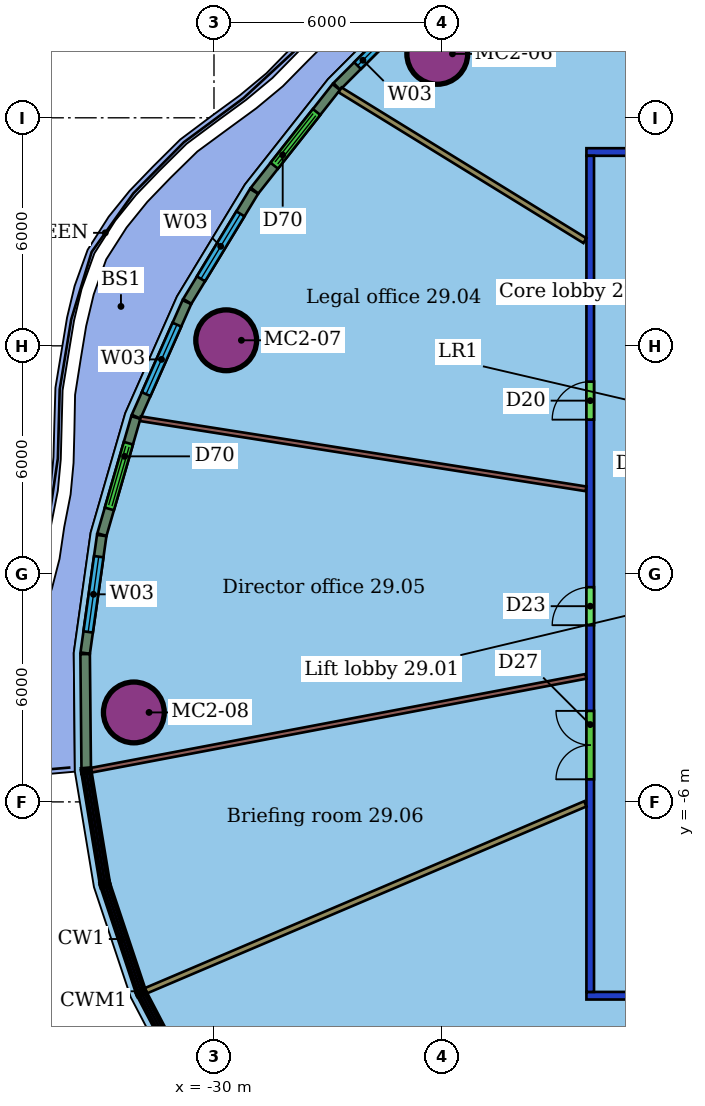
"""IFC4 building model, lengths in metres.
Left out: names, types, materials, properties, quantities, classifications, styles, units other than length and angle.
Written with IfcOpenShell. Run it as: python <this file> out.ifc"""

import sys

from ifc_helpers import new_model, si_unit, direction, frame, frame_2d, origin, origin_2d, place, context, subcontext, project, spatial, rectangle, hollow_circle, extrude, element, fill, save


model = new_model("IFC4")
c1 = context("Model", 3, precision=1e-05, world=origin(), true_north=direction((0.0, 1.0)))
c2 = subcontext(c1, "Body", "Model", "MODEL_VIEW")
j1 = project(units=[si_unit("LENGTHUNIT", "METRE"), si_unit("PLANEANGLEUNIT", "RADIAN")], contexts=[c1])
p1 = place(None, origin())
s1 = spatial("IfcSite", under=j1, at=p1, CompositionType="ELEMENT")
p2 = place(p1, origin())
s2 = spatial("IfcBuilding", under=s1, at=p2, CompositionType="ELEMENT")
p3 = place(p2, frame((0.0, 0.0, 124.6)))
s3 = spatial("IfcBuildingStorey", under=s2, at=p3, CompositionType="ELEMENT", Elevation=124.6)
for number, where, z_axis, x_axis in (
    (1, (-24.125, 13.683, 0.0), (0.0, 0.0, 1.0), (1.0, 0.0, 0.0)),
    (2, (-29.679, 6.146, 0.0), (0.0, 0.0, 1.0), (1.0, 0.0, 0.0)),
    (3, (-32.109, -3.646, 0.0), (0.0, 0.0, 1.0), (1.0, 0.0, 0.0)),
):
    element("IfcColumn", number, at=place(p3, frame(where, z_axis=z_axis, x_axis=x_axis)), inside=s3, PredefinedType="COLUMN", context=c2, shape_type="SweptSolid", body=[
        extrude(hollow_circle(Radius=0.8, WallThickness=0.055, at=origin_2d()), origin(), (0.0, 0.0, 1.0), 3.45),
    ])
p4 = place(p3, frame((8.2, -11.1, 0.0), z_axis=(0.0, 0.0, 1.0), x_axis=(-1.0, 0.0, 0.0)))
e4 = element("IfcWall", 4, at=p4, inside=s3, PredefinedType="PARTITIONING", context=c2, shape_type="SweptSolid", body=[
    extrude(rectangle(XDim=28.4, YDim=0.2, at=frame_2d((14.2, 0.0))), origin(), (0.0, 0.0, 1.0), 3.0),
])
p5 = place(p4, frame((22.496, 0.0, 0.0)))
e5 = element("IfcOpeningElement", 5, at=p5, cuts=e4, PredefinedType="OPENING", context=c2, shape_type="SweptSolid", body=[
    extrude(rectangle(XDim=0.9, YDim=2.1, at=frame_2d((0.45, 1.05))), frame((0.0, 0.11, 0.0), z_axis=(0.0, -1.0, 0.0), x_axis=(1.0, 0.0, 0.0)), (0.0, 0.0, 1.0), 0.22),
])
p6 = place(p4, frame((17.136, 0.0, 0.0)))
e6 = element("IfcOpeningElement", 6, at=p6, cuts=e4, PredefinedType="OPENING", context=c2, shape_type="SweptSolid", body=[
    extrude(rectangle(XDim=1.8, YDim=2.4, at=frame_2d((0.9, 1.2))), frame((0.0, 0.11, 0.0), z_axis=(0.0, -1.0, 0.0), x_axis=(1.0, 0.0, 0.0)), (0.0, 0.0, 1.0), 0.22),
])
p7 = place(p4, frame((12.396, 0.0, 0.0)))
e7 = element("IfcOpeningElement", 7, at=p7, cuts=e4, PredefinedType="OPENING", context=c2, shape_type="SweptSolid", body=[
    extrude(rectangle(XDim=0.9, YDim=2.1, at=frame_2d((0.45, 1.05))), frame((0.0, 0.11, 0.0), z_axis=(0.0, -1.0, 0.0), x_axis=(1.0, 0.0, 0.0)), (0.0, 0.0, 1.0), 0.22),
])
p8 = place(p4, frame((8.099, 0.0, 0.0)))
e8 = element("IfcOpeningElement", 8, at=p8, cuts=e4, PredefinedType="OPENING", context=c2, shape_type="SweptSolid", body=[
    extrude(rectangle(XDim=1.5, YDim=2.1, at=frame_2d((0.75, 1.05))), frame((0.0, 0.11, 0.0), z_axis=(0.0, -1.0, 0.0), x_axis=(1.0, 0.0, 0.0)), (0.0, 0.0, 1.0), 0.22),
])
p9 = place(p3, frame((-20.1, -11.0, 0.0), z_axis=(0.0, 0.0, 1.0), x_axis=(0.0, 1.0, 0.0)))
e9 = element("IfcWall", 9, at=p9, inside=s3, PredefinedType="PARTITIONING", context=c2, shape_type="SweptSolid", body=[
    extrude(rectangle(XDim=22.0, YDim=0.2, at=frame_2d((11.0, 0.0))), origin(), (0.0, 0.0, 1.0), 3.0),
])
p10 = place(p9, frame((15.057, 0.0, 0.0)))
e10 = element("IfcOpeningElement", 10, at=p10, cuts=e9, PredefinedType="OPENING", context=c2, shape_type="SweptSolid", body=[
    extrude(rectangle(XDim=1.0, YDim=2.1, at=frame_2d((0.5, 1.05))), frame((0.0, 0.11, 0.0), z_axis=(0.0, -1.0, 0.0), x_axis=(1.0, 0.0, 0.0)), (0.0, 0.0, 1.0), 0.22),
])
p11 = place(p9, frame((9.649, 0.0, 0.0)))
e11 = element("IfcOpeningElement", 11, at=p11, cuts=e9, PredefinedType="OPENING", context=c2, shape_type="SweptSolid", body=[
    extrude(rectangle(XDim=1.0, YDim=2.4, at=frame_2d((0.5, 1.2))), frame((0.0, 0.11, 0.0), z_axis=(0.0, -1.0, 0.0), x_axis=(1.0, 0.0, 0.0)), (0.0, 0.0, 1.0), 0.22),
])
p12 = place(p9, frame((5.594, 0.0, 0.0)))
e12 = element("IfcOpeningElement", 12, at=p12, cuts=e9, PredefinedType="OPENING", context=c2, shape_type="SweptSolid", body=[
    extrude(rectangle(XDim=1.8, YDim=2.4, at=frame_2d((0.9, 1.2))), frame((0.0, 0.11, 0.0), z_axis=(0.0, -1.0, 0.0), x_axis=(1.0, 0.0, 0.0)), (0.0, 0.0, 1.0), 0.22),
])
p13 = place(p3, frame((-20.2, 11.1, 0.0), z_axis=(0.0, 0.0, 1.0), x_axis=(1.0, 0.0, 0.0)))
e13 = element("IfcWall", 13, at=p13, inside=s3, PredefinedType="PARTITIONING", context=c2, shape_type="SweptSolid", body=[
    extrude(rectangle(XDim=28.4, YDim=0.2, at=frame_2d((14.2, 0.0))), origin(), (0.0, 0.0, 1.0), 3.0),
])
p14 = place(p13, frame((17.346, 0.0, 0.0)))
e14 = element("IfcOpeningElement", 14, at=p14, cuts=e13, PredefinedType="OPENING", context=c2, shape_type="SweptSolid", body=[
    extrude(rectangle(XDim=1.5, YDim=2.1, at=frame_2d((0.75, 1.05))), frame((0.0, 0.11, 0.0), z_axis=(0.0, -1.0, 0.0), x_axis=(1.0, 0.0, 0.0)), (0.0, 0.0, 1.0), 0.22),
])
p15 = place(p13, frame((10.966, 0.0, 0.0)))
e15 = element("IfcOpeningElement", 15, at=p15, cuts=e13, PredefinedType="OPENING", context=c2, shape_type="SweptSolid", body=[
    extrude(rectangle(XDim=1.0, YDim=2.1, at=frame_2d((0.5, 1.05))), frame((0.0, 0.11, 0.0), z_axis=(0.0, -1.0, 0.0), x_axis=(1.0, 0.0, 0.0)), (0.0, 0.0, 1.0), 0.22),
])
p16 = place(p13, frame((5.806, 0.0, 0.0)))
e16 = element("IfcOpeningElement", 16, at=p16, cuts=e13, PredefinedType="OPENING", context=c2, shape_type="SweptSolid", body=[
    extrude(rectangle(XDim=0.9, YDim=2.1, at=frame_2d((0.45, 1.05))), frame((0.0, 0.11, 0.0), z_axis=(0.0, -1.0, 0.0), x_axis=(1.0, 0.0, 0.0)), (0.0, 0.0, 1.0), 0.22),
])
p17 = place(p13, frame((22.226, 0.0, 0.0)))
e17 = element("IfcOpeningElement", 17, at=p17, cuts=e13, PredefinedType="OPENING", context=c2, shape_type="SweptSolid", body=[
    extrude(rectangle(XDim=1.8, YDim=2.1, at=frame_2d((0.9, 1.05))), frame((0.0, 0.11, 0.0), z_axis=(0.0, -1.0, 0.0), x_axis=(1.0, 0.0, 0.0)), (0.0, 0.0, 1.0), 0.22),
])
p18 = place(p3, frame((-26.683, 12.735, 0.0), z_axis=(0.0, 0.0, 1.0), x_axis=(0.851532002379, -0.524302631049, 0.0)))
e18 = element("IfcWall", 18, at=p18, inside=s3, PredefinedType="PARTITIONING", context=c2, shape_type="SweptSolid", body=[
    extrude(rectangle(XDim=7.567, YDim=0.15, at=frame_2d((3.783, 0.0))), origin(), (0.0, 0.0, 1.0), 3.45),
])
p19 = place(p3, frame((-31.936, 4.082, 0.0), z_axis=(0.0, 0.0, 1.0), x_axis=(0.98783839034, -0.155484129645, 0.0)))
e19 = element("IfcWall", 19, at=p19, inside=s3, PredefinedType="PARTITIONING", context=c2, shape_type="SweptSolid", body=[
    extrude(rectangle(XDim=11.871, YDim=0.125, at=frame_2d((5.935, 0.0))), origin(), (0.0, 0.0, 1.0), 3.45),
])
p20 = place(p3, frame((-33.238, -5.168, 0.0), z_axis=(0.0, 0.0, 1.0), x_axis=(0.982472572184, 0.186407201863, 0.0)))
e20 = element("IfcWall", 20, at=p20, inside=s3, PredefinedType="PARTITIONING", context=c2, shape_type="SweptSolid", body=[
    extrude(rectangle(XDim=13.258, YDim=0.125, at=frame_2d((6.629, 0.0))), origin(), (0.0, 0.0, 1.0), 3.45),
])
p21 = place(p3, frame((-31.8, -10.973, 0.0), z_axis=(0.0, 0.0, 1.0), x_axis=(0.920233208225, 0.391370467052, 0.0)))
e21 = element("IfcWall", 21, at=p21, inside=s3, PredefinedType="PARTITIONING", context=c2, shape_type="SweptSolid", body=[
    extrude(rectangle(XDim=12.573, YDim=0.15, at=frame_2d((6.287, 0.0))), origin(), (0.0, 0.0, 1.0), 3.45),
])
p22 = place(p3, frame((-24.264, 15.334, 0.0), z_axis=(0.0, 0.0, 1.0), x_axis=(-0.706555538576, -0.707657594397, 0.0)))
e22 = element("IfcWall", 22, at=p22, inside=s3, PredefinedType="SOLIDWALL", context=c2, shape_type="SweptSolid", body=[
    extrude(rectangle(XDim=3.544, YDim=0.25, at=frame_2d((1.772, 0.0))), origin(), (0.0, 0.0, 1.0), 3.05),
])
p23 = place(p22, frame((0.772, 0.0, 0.9)))
e23 = element("IfcOpeningElement", 23, at=p23, cuts=e22, PredefinedType="OPENING", context=c2, shape_type="SweptSolid", body=[
    extrude(rectangle(XDim=2.0, YDim=2.1, at=frame_2d((1.0, 1.05))), frame((0.0, 0.135, 0.0), z_axis=(0.0, -1.0, 0.0), x_axis=(1.0, 0.0, 0.0)), (0.0, 0.0, 1.0), 0.27),
])
p24 = place(p3, frame((-26.783, 12.809, 0.0), z_axis=(0.0, 0.0, 1.0), x_axis=(-0.61919708365, -0.785235615341, 0.0)))
e24 = element("IfcWall", 24, at=p24, inside=s3, PredefinedType="SOLIDWALL", context=c2, shape_type="SweptSolid", body=[
    extrude(rectangle(XDim=3.47, YDim=0.25, at=frame_2d((1.735, 0.0))), origin(), (0.0, 0.0, 1.0), 3.05),
])
p25 = place(p24, frame((0.835, 0.0, 0.0)))
e25 = element("IfcOpeningElement", 25, at=p25, cuts=e24, PredefinedType="OPENING", context=c2, shape_type="SweptSolid", body=[
    extrude(rectangle(XDim=1.8, YDim=2.4, at=frame_2d((0.9, 1.2))), frame((0.0, 0.135, 0.0), z_axis=(0.0, -1.0, 0.0), x_axis=(1.0, 0.0, 0.0)), (0.0, 0.0, 1.0), 0.27),
])
p26 = place(p3, frame((-28.945, 10.065, 0.0), z_axis=(0.0, 0.0, 1.0), x_axis=(-0.518868982656, -0.85485377629, 0.0)))
e26 = element("IfcWall", 26, at=p26, inside=s3, PredefinedType="SOLIDWALL", context=c2, shape_type="SweptSolid", body=[
    extrude(rectangle(XDim=3.385, YDim=0.25, at=frame_2d((1.693, 0.0))), origin(), (0.0, 0.0, 1.0), 3.05),
])
p27 = place(p26, frame((0.693, 0.0, 0.9)))
e27 = element("IfcOpeningElement", 27, at=p27, cuts=e26, PredefinedType="OPENING", context=c2, shape_type="SweptSolid", body=[
    extrude(rectangle(XDim=2.0, YDim=2.1, at=frame_2d((1.0, 1.05))), frame((0.0, 0.135, 0.0), z_axis=(0.0, -1.0, 0.0), x_axis=(1.0, 0.0, 0.0)), (0.0, 0.0, 1.0), 0.27),
])
p28 = place(p3, frame((-30.713, 7.149, 0.0), z_axis=(0.0, 0.0, 1.0), x_axis=(-0.405155306017, -0.914247875582, 0.0)))
e28 = element("IfcWall", 28, at=p28, inside=s3, PredefinedType="SOLIDWALL", context=c2, shape_type="SweptSolid", body=[
    extrude(rectangle(XDim=3.296, YDim=0.25, at=frame_2d((1.648, 0.0))), origin(), (0.0, 0.0, 1.0), 3.05),
])
p29 = place(p28, frame((0.648, 0.0, 0.9)))
e29 = element("IfcOpeningElement", 29, at=p29, cuts=e28, PredefinedType="OPENING", context=c2, shape_type="SweptSolid", body=[
    extrude(rectangle(XDim=2.0, YDim=2.1, at=frame_2d((1.0, 1.05))), frame((0.0, 0.135, 0.0), z_axis=(0.0, -1.0, 0.0), x_axis=(1.0, 0.0, 0.0)), (0.0, 0.0, 1.0), 0.27),
])
p30 = place(p3, frame((-32.057, 4.113, 0.0), z_axis=(0.0, 0.0, 1.0), x_axis=(-0.27825961791, -0.960505900576, 0.0)))
e30 = element("IfcWall", 30, at=p30, inside=s3, PredefinedType="SOLIDWALL", context=c2, shape_type="SweptSolid", body=[
    extrude(rectangle(XDim=3.206, YDim=0.25, at=frame_2d((1.603, 0.0))), origin(), (0.0, 0.0, 1.0), 3.05),
])
p31 = place(p30, frame((0.703, 0.0, 0.0)))
e31 = element("IfcOpeningElement", 31, at=p31, cuts=e30, PredefinedType="OPENING", context=c2, shape_type="SweptSolid", body=[
    extrude(rectangle(XDim=1.8, YDim=2.4, at=frame_2d((0.9, 1.2))), frame((0.0, 0.135, 0.0), z_axis=(0.0, -1.0, 0.0), x_axis=(1.0, 0.0, 0.0)), (0.0, 0.0, 1.0), 0.27),
])
p32 = place(p3, frame((-32.954, 1.009, 0.0), z_axis=(0.0, 0.0, 1.0), x_axis=(-0.139133868146, -0.990273581762, 0.0)))
e32 = element("IfcWall", 32, at=p32, inside=s3, PredefinedType="SOLIDWALL", context=c2, shape_type="SweptSolid", body=[
    extrude(rectangle(XDim=3.123, YDim=0.25, at=frame_2d((1.562, 0.0))), origin(), (0.0, 0.0, 1.0), 3.05),
])
p33 = place(p32, frame((0.562, 0.0, 0.9)))
e33 = element("IfcOpeningElement", 33, at=p33, cuts=e32, PredefinedType="OPENING", context=c2, shape_type="SweptSolid", body=[
    extrude(rectangle(XDim=2.0, YDim=2.1, at=frame_2d((1.0, 1.05))), frame((0.0, 0.135, 0.0), z_axis=(0.0, -1.0, 0.0), x_axis=(1.0, 0.0, 0.0)), (0.0, 0.0, 1.0), 0.27),
])
p34 = place(p3, frame((-33.391, -2.111, 0.0), z_axis=(0.0, 0.0, 1.0), x_axis=(0.009399908842, -0.999955819881, 0.0)))
e34 = element("IfcWall", 34, at=p34, inside=s3, PredefinedType="SOLIDWALL", context=c2, shape_type="SweptSolid", body=[
    extrude(rectangle(XDim=3.013, YDim=0.25, at=frame_2d((1.506, 0.0))), origin(), (0.0, 0.0, 1.0), 3.05),
])
p35 = place(p10, origin())
e35 = element("IfcDoor", 35, at=p35, inside=s3, OperationType="SINGLE_SWING_LEFT", PredefinedType="DOOR", context=c2, shape_type="SweptSolid", body=[
    extrude(rectangle(XDim=1.0, YDim=2.1, at=frame_2d((0.5, 1.05))), frame((0.0, 0.025, 0.0), z_axis=(0.0, -1.0, 0.0), x_axis=(1.0, 0.0, 0.0)), (0.0, 0.0, 1.0), 0.05),
])
fill(e10, e35)
p36 = place(p11, origin())
e36 = element("IfcDoor", 36, at=p36, inside=s3, OperationType="SINGLE_SWING_LEFT", PredefinedType="DOOR", context=c2, shape_type="SweptSolid", body=[
    extrude(rectangle(XDim=1.0, YDim=2.4, at=frame_2d((0.5, 1.2))), frame((0.0, 0.025, 0.0), z_axis=(0.0, -1.0, 0.0), x_axis=(1.0, 0.0, 0.0)), (0.0, 0.0, 1.0), 0.05),
])
fill(e11, e36)
p37 = place(p12, origin())
e37 = element("IfcDoor", 37, at=p37, inside=s3, OperationType="DOUBLE_DOOR_SINGLE_SWING", PredefinedType="DOOR", context=c2, shape_type="SweptSolid", body=[
    extrude(rectangle(XDim=1.8, YDim=2.4, at=frame_2d((0.9, 1.2))), frame((0.0, 0.025, 0.0), z_axis=(0.0, -1.0, 0.0), x_axis=(1.0, 0.0, 0.0)), (0.0, 0.0, 1.0), 0.05),
])
fill(e12, e37)
p38 = place(p23, origin())
e38 = element("IfcWindow", 38, at=p38, inside=s3, PartitioningType="SINGLE_PANEL", PredefinedType="WINDOW", context=c2, shape_type="SweptSolid", body=[
    extrude(rectangle(XDim=2.0, YDim=2.1, at=frame_2d((1.0, 1.05))), frame((0.0, 0.03, 0.0), z_axis=(0.0, -1.0, 0.0), x_axis=(1.0, 0.0, 0.0)), (0.0, 0.0, 1.0), 0.06),
])
fill(e23, e38)
p39 = place(p25, origin())
e39 = element("IfcDoor", 39, at=p39, inside=s3, OperationType="DOUBLE_DOOR_SLIDING", PredefinedType="DOOR", context=c2, shape_type="SweptSolid", body=[
    extrude(rectangle(XDim=1.8, YDim=2.4, at=frame_2d((0.9, 1.2))), frame((0.0, 0.025, 0.0), z_axis=(0.0, -1.0, 0.0), x_axis=(1.0, 0.0, 0.0)), (0.0, 0.0, 1.0), 0.05),
])
fill(e25, e39)
p40 = place(p27, origin())
e40 = element("IfcWindow", 40, at=p40, inside=s3, PartitioningType="SINGLE_PANEL", PredefinedType="WINDOW", context=c2, shape_type="SweptSolid", body=[
    extrude(rectangle(XDim=2.0, YDim=2.1, at=frame_2d((1.0, 1.05))), frame((0.0, 0.03, 0.0), z_axis=(0.0, -1.0, 0.0), x_axis=(1.0, 0.0, 0.0)), (0.0, 0.0, 1.0), 0.06),
])
fill(e27, e40)
p41 = place(p29, origin())
e41 = element("IfcWindow", 41, at=p41, inside=s3, PartitioningType="SINGLE_PANEL", PredefinedType="WINDOW", context=c2, shape_type="SweptSolid", body=[
    extrude(rectangle(XDim=2.0, YDim=2.1, at=frame_2d((1.0, 1.05))), frame((0.0, 0.03, 0.0), z_axis=(0.0, -1.0, 0.0), x_axis=(1.0, 0.0, 0.0)), (0.0, 0.0, 1.0), 0.06),
])
fill(e29, e41)
p42 = place(p31, origin())
e42 = element("IfcDoor", 42, at=p42, inside=s3, OperationType="DOUBLE_DOOR_SLIDING", PredefinedType="DOOR", context=c2, shape_type="SweptSolid", body=[
    extrude(rectangle(XDim=1.8, YDim=2.4, at=frame_2d((0.9, 1.2))), frame((0.0, 0.025, 0.0), z_axis=(0.0, -1.0, 0.0), x_axis=(1.0, 0.0, 0.0)), (0.0, 0.0, 1.0), 0.05),
])
fill(e31, e42)
p43 = place(p33, origin())
e43 = element("IfcWindow", 43, at=p43, inside=s3, PartitioningType="SINGLE_PANEL", PredefinedType="WINDOW", context=c2, shape_type="SweptSolid", body=[
    extrude(rectangle(XDim=2.0, YDim=2.1, at=frame_2d((1.0, 1.05))), frame((0.0, 0.03, 0.0), z_axis=(0.0, -1.0, 0.0), x_axis=(1.0, 0.0, 0.0)), (0.0, 0.0, 1.0), 0.06),
])
fill(e33, e43)
save(model, sys.argv[1])
